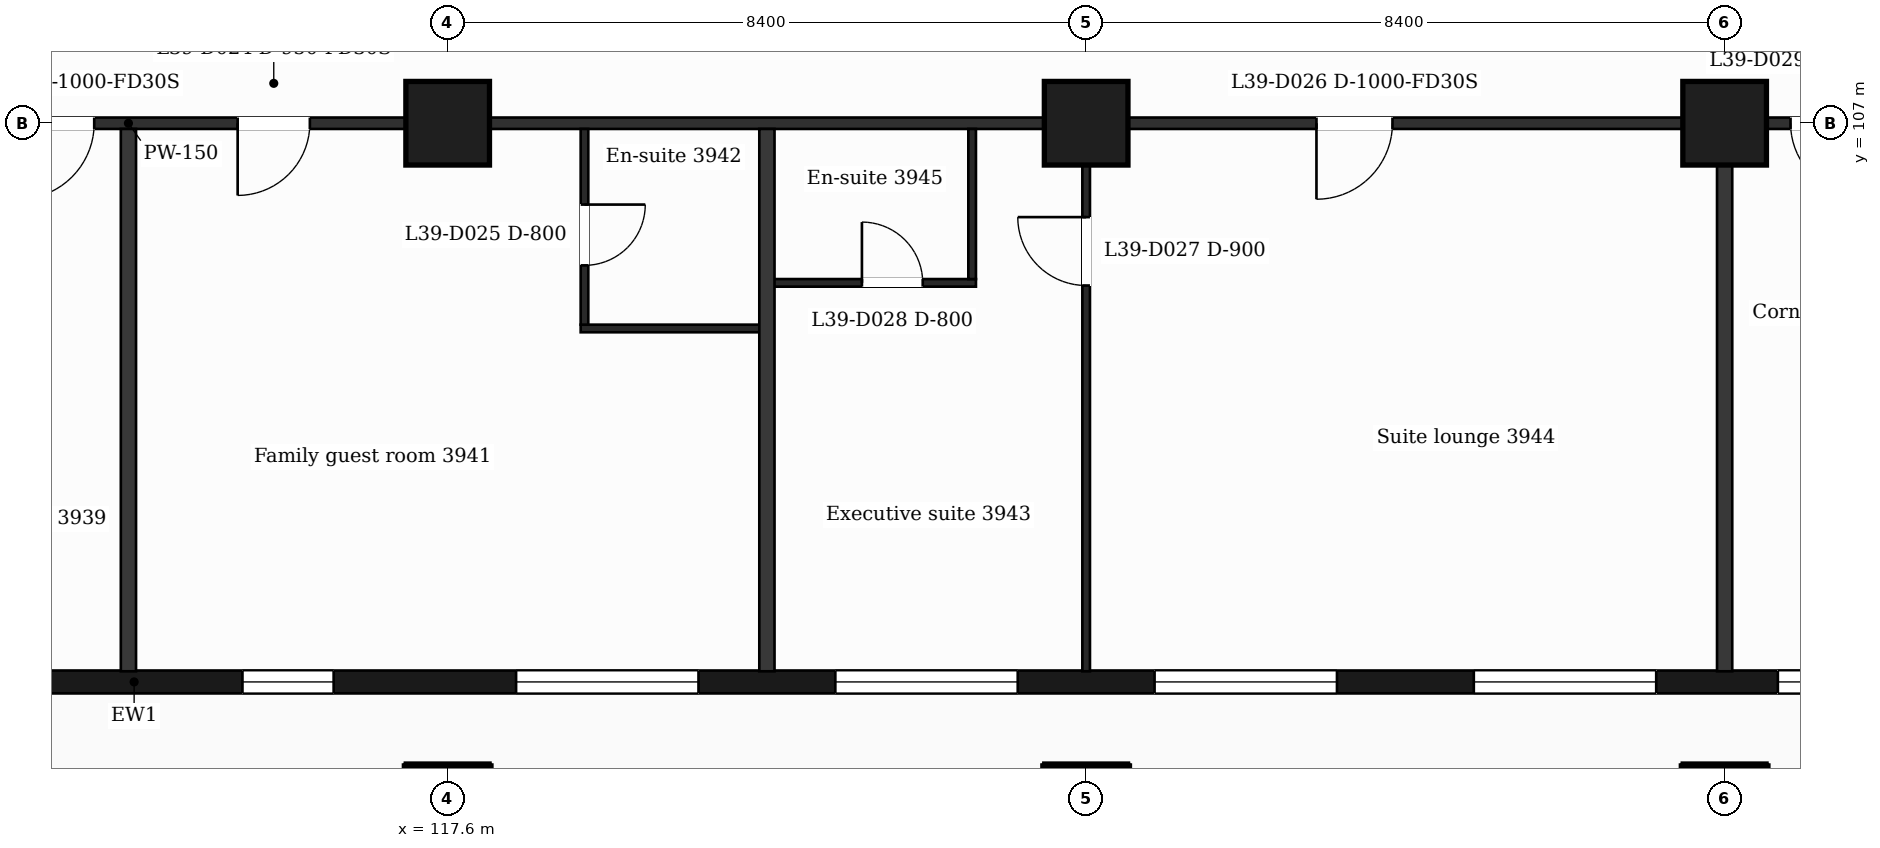
"""IFC4 building model, lengths in metres.
Left out: names, types, materials, properties, quantities, classifications, styles, units other than length and angle.
Written with IfcOpenShell. Run it as: python <this file> out.ifc"""

import sys

from ifc_helpers import new_model, si_unit, direction, frame, frame_2d, origin, origin_2d, place, context, subcontext, project, spatial, rectangle, extrude, element, fill, save


model = new_model("IFC4")
c1 = context("Model", 3, precision=1e-05, world=origin(), true_north=direction((0.0, 1.0)))
c2 = subcontext(c1, "Body", "Model", "MODEL_VIEW")
j1 = project(units=[si_unit("LENGTHUNIT", "METRE"), si_unit("PLANEANGLEUNIT", "RADIAN")], contexts=[c1])
p1 = place(None, origin())
s1 = spatial("IfcSite", under=j1, at=p1, CompositionType="ELEMENT")
p2 = place(p1, origin())
s2 = spatial("IfcBuilding", under=s1, at=p2, CompositionType="ELEMENT")
p3 = place(p2, frame((0.0, 0.0, 166.3)))
s3 = spatial("IfcBuildingStorey", under=s2, at=p3, CompositionType="ELEMENT", Elevation=166.3)
for number, where, z_axis, x_axis in (
    (1, (117.6, 98.0, 0.0), (0.0, 0.0, 1.0), (1.0, 0.0, 0.0)),
    (2, (126.0, 98.0, 0.0), (0.0, 0.0, 1.0), (1.0, 0.0, 0.0)),
    (3, (134.4, 98.0, 0.0), (0.0, 0.0, 1.0), (1.0, 0.0, 0.0)),
    (4, (117.6, 107.0, 0.0), (0.0, 0.0, 1.0), (1.0, 0.0, 0.0)),
    (5, (126.0, 107.0, 0.0), (0.0, 0.0, 1.0), (1.0, 0.0, 0.0)),
    (6, (134.4, 107.0, 0.0), (0.0, 0.0, 1.0), (1.0, 0.0, 0.0)),
):
    element("IfcColumn", number, at=place(p3, frame(where, z_axis=z_axis, x_axis=x_axis)), inside=s3, PredefinedType="COLUMN", context=c2, shape_type="SweptSolid", body=[
        extrude(rectangle(XDim=1.1, YDim=1.1, at=origin_2d()), origin(), (0.0, 0.0, 1.0), 3.7),
    ])
p4 = place(p3, frame((89.85, 99.65, 0.0), z_axis=(0.0, 0.0, 1.0), x_axis=(1.0, 0.0, 0.0)))
e7 = element("IfcWall", 7, at=p4, inside=s3, PredefinedType="SOLIDWALL", context=c2, shape_type="SweptSolid", body=[
    extrude(rectangle(XDim=47.25, YDim=0.3, at=frame_2d((23.625, 0.0))), origin(), (0.0, 0.0, 1.0), 3.38),
])
p5 = place(p4, frame((0.725, 0.0, 0.9)))
e8 = element("IfcOpeningElement", 8, at=p5, cuts=e7, PredefinedType="OPENING", context=c2, shape_type="SweptSolid", body=[
    extrude(rectangle(XDim=1.2, YDim=2.1, at=frame_2d((0.6, 1.05))), frame((0.0, 0.16, 0.0), z_axis=(0.0, -1.0, 0.0), x_axis=(1.0, 0.0, 0.0)), (0.0, 0.0, 1.0), 0.32),
])
p6 = place(p4, frame((3.45, 0.0, 0.9)))
e9 = element("IfcOpeningElement", 9, at=p6, cuts=e7, PredefinedType="OPENING", context=c2, shape_type="SweptSolid", body=[
    extrude(rectangle(XDim=2.4, YDim=2.1, at=frame_2d((1.2, 1.05))), frame((0.0, 0.16, 0.0), z_axis=(0.0, -1.0, 0.0), x_axis=(1.0, 0.0, 0.0)), (0.0, 0.0, 1.0), 0.32),
])
p7 = place(p4, frame((7.35, 0.0, 0.0)))
e10 = element("IfcOpeningElement", 10, at=p7, cuts=e7, PredefinedType="OPENING", context=c2, shape_type="SweptSolid", body=[
    extrude(rectangle(XDim=1.2, YDim=2.4, at=frame_2d((0.6, 1.2))), frame((0.0, 0.16, 0.0), z_axis=(0.0, -1.0, 0.0), x_axis=(1.0, 0.0, 0.0)), (0.0, 0.0, 1.0), 0.32),
])
p8 = place(p4, frame((9.15, 0.0, 0.9)))
e11 = element("IfcOpeningElement", 11, at=p8, cuts=e7, PredefinedType="OPENING", context=c2, shape_type="SweptSolid", body=[
    extrude(rectangle(XDim=1.2, YDim=2.1, at=frame_2d((0.6, 1.05))), frame((0.0, 0.16, 0.0), z_axis=(0.0, -1.0, 0.0), x_axis=(1.0, 0.0, 0.0)), (0.0, 0.0, 1.0), 0.32),
])
p9 = place(p4, frame((11.85, 0.0, 0.9)))
e12 = element("IfcOpeningElement", 12, at=p9, cuts=e7, PredefinedType="OPENING", context=c2, shape_type="SweptSolid", body=[
    extrude(rectangle(XDim=2.4, YDim=2.1, at=frame_2d((1.2, 1.05))), frame((0.0, 0.16, 0.0), z_axis=(0.0, -1.0, 0.0), x_axis=(1.0, 0.0, 0.0)), (0.0, 0.0, 1.0), 0.32),
])
p10 = place(p4, frame((16.05, 0.0, 0.9)))
e13 = element("IfcOpeningElement", 13, at=p10, cuts=e7, PredefinedType="OPENING", context=c2, shape_type="SweptSolid", body=[
    extrude(rectangle(XDim=2.4, YDim=2.1, at=frame_2d((1.2, 1.05))), frame((0.0, 0.16, 0.0), z_axis=(0.0, -1.0, 0.0), x_axis=(1.0, 0.0, 0.0)), (0.0, 0.0, 1.0), 0.32),
])
p11 = place(p4, frame((20.85, 0.0, 0.9)))
e14 = element("IfcOpeningElement", 14, at=p11, cuts=e7, PredefinedType="OPENING", context=c2, shape_type="SweptSolid", body=[
    extrude(rectangle(XDim=1.2, YDim=2.1, at=frame_2d((0.6, 1.05))), frame((0.0, 0.16, 0.0), z_axis=(0.0, -1.0, 0.0), x_axis=(1.0, 0.0, 0.0)), (0.0, 0.0, 1.0), 0.32),
])
p12 = place(p4, frame((25.05, 0.0, 0.9)))
e15 = element("IfcOpeningElement", 15, at=p12, cuts=e7, PredefinedType="OPENING", context=c2, shape_type="SweptSolid", body=[
    extrude(rectangle(XDim=1.2, YDim=2.1, at=frame_2d((0.6, 1.05))), frame((0.0, 0.16, 0.0), z_axis=(0.0, -1.0, 0.0), x_axis=(1.0, 0.0, 0.0)), (0.0, 0.0, 1.0), 0.32),
])
p13 = place(p4, frame((28.65, 0.0, 0.9)))
e16 = element("IfcOpeningElement", 16, at=p13, cuts=e7, PredefinedType="OPENING", context=c2, shape_type="SweptSolid", body=[
    extrude(rectangle(XDim=2.4, YDim=2.1, at=frame_2d((1.2, 1.05))), frame((0.0, 0.16, 0.0), z_axis=(0.0, -1.0, 0.0), x_axis=(1.0, 0.0, 0.0)), (0.0, 0.0, 1.0), 0.32),
])
p14 = place(p4, frame((32.85, 0.0, 0.9)))
e17 = element("IfcOpeningElement", 17, at=p14, cuts=e7, PredefinedType="OPENING", context=c2, shape_type="SweptSolid", body=[
    extrude(rectangle(XDim=2.4, YDim=2.1, at=frame_2d((1.2, 1.05))), frame((0.0, 0.16, 0.0), z_axis=(0.0, -1.0, 0.0), x_axis=(1.0, 0.0, 0.0)), (0.0, 0.0, 1.0), 0.32),
])
p15 = place(p4, frame((37.05, 0.0, 0.9)))
e18 = element("IfcOpeningElement", 18, at=p15, cuts=e7, PredefinedType="OPENING", context=c2, shape_type="SweptSolid", body=[
    extrude(rectangle(XDim=2.4, YDim=2.1, at=frame_2d((1.2, 1.05))), frame((0.0, 0.16, 0.0), z_axis=(0.0, -1.0, 0.0), x_axis=(1.0, 0.0, 0.0)), (0.0, 0.0, 1.0), 0.32),
])
p16 = place(p4, frame((41.25, 0.0, 0.9)))
e19 = element("IfcOpeningElement", 19, at=p16, cuts=e7, PredefinedType="OPENING", context=c2, shape_type="SweptSolid", body=[
    extrude(rectangle(XDim=2.4, YDim=2.1, at=frame_2d((1.2, 1.05))), frame((0.0, 0.16, 0.0), z_axis=(0.0, -1.0, 0.0), x_axis=(1.0, 0.0, 0.0)), (0.0, 0.0, 1.0), 0.32),
])
p17 = place(p4, frame((45.25, 0.0, 0.9)))
e20 = element("IfcOpeningElement", 20, at=p17, cuts=e7, PredefinedType="OPENING", context=c2, shape_type="SweptSolid", body=[
    extrude(rectangle(XDim=1.2, YDim=2.1, at=frame_2d((0.6, 1.05))), frame((0.0, 0.16, 0.0), z_axis=(0.0, -1.0, 0.0), x_axis=(1.0, 0.0, 0.0)), (0.0, 0.0, 1.0), 0.32),
])
p18 = place(p3, frame((119.35, 104.3, 0.0), z_axis=(0.0, 0.0, 1.0), x_axis=(1.0, 0.0, 0.0)))
e21 = element("IfcWall", 21, at=p18, inside=s3, PredefinedType="PARTITIONING", context=c2, shape_type="SweptSolid", body=[
    extrude(rectangle(XDim=2.45, YDim=0.1, at=frame_2d((1.225, 0.0))), origin(), (0.0, 0.0, 1.0), 3.38),
])
p19 = place(p3, frame((121.8, 104.9, 0.0), z_axis=(0.0, 0.0, 1.0), x_axis=(1.0, 0.0, 0.0)))
e22 = element("IfcWall", 22, at=p19, inside=s3, PredefinedType="PARTITIONING", context=c2, shape_type="SweptSolid", body=[
    extrude(rectangle(XDim=2.75, YDim=0.1, at=frame_2d((1.375, 0.0))), origin(), (0.0, 0.0, 1.0), 3.38),
])
p20 = place(p19, frame((1.25, 0.0, 0.0)))
e23 = element("IfcOpeningElement", 23, at=p20, cuts=e22, PredefinedType="OPENING", context=c2, shape_type="SweptSolid", body=[
    extrude(rectangle(XDim=0.8, YDim=2.1, at=frame_2d((0.4, 1.05))), frame((0.0, 0.06, 0.0), z_axis=(0.0, -1.0, 0.0), x_axis=(1.0, 0.0, 0.0)), (0.0, 0.0, 1.0), 0.12),
])
p21 = place(p3, frame((87.018, 107.0, 0.0), z_axis=(0.0, 0.0, 1.0), x_axis=(1.0, 0.0, 0.0)))
e24 = element("IfcWall", 24, at=p21, inside=s3, PredefinedType="PARTITIONING", context=c2, shape_type="SweptSolid", body=[
    extrude(rectangle(XDim=52.765, YDim=0.15, at=frame_2d((26.382, 0.0))), origin(), (0.0, 0.0, 1.0), 3.38),
])
p22 = place(p21, frame((0.463, 0.0, 0.0)))
e25 = element("IfcOpeningElement", 25, at=p22, cuts=e24, PredefinedType="OPENING", context=c2, shape_type="SweptSolid", body=[
    extrude(rectangle(XDim=0.95, YDim=2.1, at=frame_2d((0.475, 1.05))), frame((0.0, 0.085, 0.0), z_axis=(0.0, -1.0, 0.0), x_axis=(1.0, 0.0, 0.0)), (0.0, 0.0, 1.0), 0.17),
])
p23 = place(p21, frame((6.369, 0.0, 0.0)))
e26 = element("IfcOpeningElement", 26, at=p23, cuts=e24, PredefinedType="OPENING", context=c2, shape_type="SweptSolid", body=[
    extrude(rectangle(XDim=0.95, YDim=2.1, at=frame_2d((0.475, 1.05))), frame((0.0, 0.085, 0.0), z_axis=(0.0, -1.0, 0.0), x_axis=(1.0, 0.0, 0.0)), (0.0, 0.0, 1.0), 0.17),
])
p24 = place(p21, frame((9.857, 0.0, 0.0)))
e27 = element("IfcOpeningElement", 27, at=p24, cuts=e24, PredefinedType="OPENING", context=c2, shape_type="SweptSolid", body=[
    extrude(rectangle(XDim=0.95, YDim=2.1, at=frame_2d((0.475, 1.05))), frame((0.0, 0.085, 0.0), z_axis=(0.0, -1.0, 0.0), x_axis=(1.0, 0.0, 0.0)), (0.0, 0.0, 1.0), 0.17),
])
p25 = place(p21, frame((15.382, 0.0, 0.0)))
e28 = element("IfcOpeningElement", 28, at=p25, cuts=e24, PredefinedType="OPENING", context=c2, shape_type="SweptSolid", body=[
    extrude(rectangle(XDim=1.0, YDim=2.1, at=frame_2d((0.5, 1.05))), frame((0.0, 0.085, 0.0), z_axis=(0.0, -1.0, 0.0), x_axis=(1.0, 0.0, 0.0)), (0.0, 0.0, 1.0), 0.17),
])
p26 = place(p21, frame((24.932, 0.0, 0.0)))
e29 = element("IfcOpeningElement", 29, at=p26, cuts=e24, PredefinedType="OPENING", context=c2, shape_type="SweptSolid", body=[
    extrude(rectangle(XDim=1.0, YDim=2.1, at=frame_2d((0.5, 1.05))), frame((0.0, 0.085, 0.0), z_axis=(0.0, -1.0, 0.0), x_axis=(1.0, 0.0, 0.0)), (0.0, 0.0, 1.0), 0.17),
])
p27 = place(p21, frame((27.819, 0.0, 0.0)))
e30 = element("IfcOpeningElement", 30, at=p27, cuts=e24, PredefinedType="OPENING", context=c2, shape_type="SweptSolid", body=[
    extrude(rectangle(XDim=0.95, YDim=2.1, at=frame_2d((0.475, 1.05))), frame((0.0, 0.085, 0.0), z_axis=(0.0, -1.0, 0.0), x_axis=(1.0, 0.0, 0.0)), (0.0, 0.0, 1.0), 0.17),
])
p28 = place(p21, frame((42.012, 0.0, 0.0)))
e31 = element("IfcOpeningElement", 31, at=p28, cuts=e24, PredefinedType="OPENING", context=c2, shape_type="SweptSolid", body=[
    extrude(rectangle(XDim=1.0, YDim=2.1, at=frame_2d((0.5, 1.05))), frame((0.0, 0.085, 0.0), z_axis=(0.0, -1.0, 0.0), x_axis=(1.0, 0.0, 0.0)), (0.0, 0.0, 1.0), 0.17),
])
p29 = place(p21, frame((48.249, 0.0, 0.0)))
e32 = element("IfcOpeningElement", 32, at=p29, cuts=e24, PredefinedType="OPENING", context=c2, shape_type="SweptSolid", body=[
    extrude(rectangle(XDim=0.95, YDim=2.1, at=frame_2d((0.475, 1.05))), frame((0.0, 0.085, 0.0), z_axis=(0.0, -1.0, 0.0), x_axis=(1.0, 0.0, 0.0)), (0.0, 0.0, 1.0), 0.17),
])
p30 = place(p3, frame((113.4, 99.79, 0.0), z_axis=(0.0, 0.0, 1.0), x_axis=(0.0, 1.0, 0.0)))
e33 = element("IfcWall", 33, at=p30, inside=s3, PredefinedType="PARTITIONING", context=c2, shape_type="SweptSolid", body=[
    extrude(rectangle(XDim=7.135, YDim=0.2, at=frame_2d((3.567, 0.0))), origin(), (0.0, 0.0, 1.0), 3.38),
])
p31 = place(p3, frame((119.4, 104.35, 0.0), z_axis=(0.0, 0.0, 1.0), x_axis=(0.0, 1.0, 0.0)))
e34 = element("IfcWall", 34, at=p31, inside=s3, PredefinedType="PARTITIONING", context=c2, shape_type="SweptSolid", body=[
    extrude(rectangle(XDim=2.575, YDim=0.1, at=frame_2d((1.288, 0.0))), origin(), (0.0, 0.0, 1.0), 3.38),
])
p32 = place(p31, frame((0.78, 0.0, 0.0)))
e35 = element("IfcOpeningElement", 35, at=p32, cuts=e34, PredefinedType="OPENING", context=c2, shape_type="SweptSolid", body=[
    extrude(rectangle(XDim=0.8, YDim=2.1, at=frame_2d((0.4, 1.05))), frame((0.0, 0.06, 0.0), z_axis=(0.0, -1.0, 0.0), x_axis=(1.0, 0.0, 0.0)), (0.0, 0.0, 1.0), 0.12),
])
p33 = place(p3, frame((121.8, 99.79, 0.0), z_axis=(0.0, 0.0, 1.0), x_axis=(0.0, 1.0, 0.0)))
e36 = element("IfcWall", 36, at=p33, inside=s3, PredefinedType="PARTITIONING", context=c2, shape_type="SweptSolid", body=[
    extrude(rectangle(XDim=7.135, YDim=0.2, at=frame_2d((3.567, 0.0))), origin(), (0.0, 0.0, 1.0), 3.38),
])
p34 = place(p3, frame((124.5, 104.95, 0.0), z_axis=(0.0, 0.0, 1.0), x_axis=(0.0, 1.0, 0.0)))
e37 = element("IfcWall", 37, at=p34, inside=s3, PredefinedType="PARTITIONING", context=c2, shape_type="SweptSolid", body=[
    extrude(rectangle(XDim=1.975, YDim=0.1, at=frame_2d((0.988, 0.0))), origin(), (0.0, 0.0, 1.0), 3.38),
])
p35 = place(p3, frame((126.0, 99.79, 0.0), z_axis=(0.0, 0.0, 1.0), x_axis=(0.0, 1.0, 0.0)))
e38 = element("IfcWall", 38, at=p35, inside=s3, PredefinedType="PARTITIONING", context=c2, shape_type="SweptSolid", body=[
    extrude(rectangle(XDim=7.135, YDim=0.1, at=frame_2d((3.567, 0.0))), origin(), (0.0, 0.0, 1.0), 3.38),
])
p36 = place(p35, frame((5.075, 0.0, 0.0)))
e39 = element("IfcOpeningElement", 39, at=p36, cuts=e38, PredefinedType="OPENING", context=c2, shape_type="SweptSolid", body=[
    extrude(rectangle(XDim=0.9, YDim=2.1, at=frame_2d((0.45, 1.05))), frame((0.0, 0.06, 0.0), z_axis=(0.0, -1.0, 0.0), x_axis=(1.0, 0.0, 0.0)), (0.0, 0.0, 1.0), 0.12),
])
p37 = place(p3, frame((134.4, 99.79, 0.0), z_axis=(0.0, 0.0, 1.0), x_axis=(0.0, 1.0, 0.0)))
e40 = element("IfcWall", 40, at=p37, inside=s3, PredefinedType="PARTITIONING", context=c2, shape_type="SweptSolid", body=[
    extrude(rectangle(XDim=7.135, YDim=0.2, at=frame_2d((3.567, 0.0))), origin(), (0.0, 0.0, 1.0), 3.38),
])
p38 = place(p12, origin())
e41 = element("IfcWindow", 41, at=p38, inside=s3, PartitioningType="SINGLE_PANEL", PredefinedType="WINDOW", context=c2, shape_type="SweptSolid", body=[
    extrude(rectangle(XDim=1.2, YDim=2.1, at=frame_2d((0.6, 1.05))), frame((0.0, 0.03, 0.0), z_axis=(0.0, -1.0, 0.0), x_axis=(1.0, 0.0, 0.0)), (0.0, 0.0, 1.0), 0.06),
])
fill(e15, e41)
p39 = place(p13, origin())
e42 = element("IfcWindow", 42, at=p39, inside=s3, PartitioningType="SINGLE_PANEL", PredefinedType="WINDOW", context=c2, shape_type="SweptSolid", body=[
    extrude(rectangle(XDim=2.4, YDim=2.1, at=frame_2d((1.2, 1.05))), frame((0.0, 0.03, 0.0), z_axis=(0.0, -1.0, 0.0), x_axis=(1.0, 0.0, 0.0)), (0.0, 0.0, 1.0), 0.06),
])
fill(e16, e42)
p40 = place(p14, origin())
e43 = element("IfcWindow", 43, at=p40, inside=s3, PartitioningType="SINGLE_PANEL", PredefinedType="WINDOW", context=c2, shape_type="SweptSolid", body=[
    extrude(rectangle(XDim=2.4, YDim=2.1, at=frame_2d((1.2, 1.05))), frame((0.0, 0.03, 0.0), z_axis=(0.0, -1.0, 0.0), x_axis=(1.0, 0.0, 0.0)), (0.0, 0.0, 1.0), 0.06),
])
fill(e17, e43)
p41 = place(p15, origin())
e44 = element("IfcWindow", 44, at=p41, inside=s3, PartitioningType="SINGLE_PANEL", PredefinedType="WINDOW", context=c2, shape_type="SweptSolid", body=[
    extrude(rectangle(XDim=2.4, YDim=2.1, at=frame_2d((1.2, 1.05))), frame((0.0, 0.03, 0.0), z_axis=(0.0, -1.0, 0.0), x_axis=(1.0, 0.0, 0.0)), (0.0, 0.0, 1.0), 0.06),
])
fill(e18, e44)
p42 = place(p16, origin())
e45 = element("IfcWindow", 45, at=p42, inside=s3, PartitioningType="SINGLE_PANEL", PredefinedType="WINDOW", context=c2, shape_type="SweptSolid", body=[
    extrude(rectangle(XDim=2.4, YDim=2.1, at=frame_2d((1.2, 1.05))), frame((0.0, 0.03, 0.0), z_axis=(0.0, -1.0, 0.0), x_axis=(1.0, 0.0, 0.0)), (0.0, 0.0, 1.0), 0.06),
])
fill(e19, e45)
p43 = place(p17, origin())
e46 = element("IfcWindow", 46, at=p43, inside=s3, PartitioningType="SINGLE_PANEL", PredefinedType="WINDOW", context=c2, shape_type="SweptSolid", body=[
    extrude(rectangle(XDim=1.2, YDim=2.1, at=frame_2d((0.6, 1.05))), frame((0.0, 0.03, 0.0), z_axis=(0.0, -1.0, 0.0), x_axis=(1.0, 0.0, 0.0)), (0.0, 0.0, 1.0), 0.06),
])
fill(e20, e46)
p44 = place(p26, origin())
e47 = element("IfcDoor", 47, at=p44, inside=s3, OperationType="SINGLE_SWING_LEFT", PredefinedType="DOOR", context=c2, shape_type="SweptSolid", body=[
    extrude(rectangle(XDim=1.0, YDim=2.1, at=frame_2d((0.5, 1.05))), frame((0.0, 0.025, 0.0), z_axis=(0.0, -1.0, 0.0), x_axis=(1.0, 0.0, 0.0)), (0.0, 0.0, 1.0), 0.05),
])
fill(e29, e47)
p45 = place(p27, origin())
e48 = element("IfcDoor", 48, at=p45, inside=s3, OperationType="SINGLE_SWING_LEFT", PredefinedType="DOOR", context=c2, shape_type="SweptSolid", body=[
    extrude(rectangle(XDim=0.95, YDim=2.1, at=frame_2d((0.475, 1.05))), frame((0.0, 0.025, 0.0), z_axis=(0.0, -1.0, 0.0), x_axis=(1.0, 0.0, 0.0)), (0.0, 0.0, 1.0), 0.05),
])
fill(e30, e48)
p46 = place(p32, origin())
e49 = element("IfcDoor", 49, at=p46, inside=s3, OperationType="SINGLE_SWING_RIGHT", PredefinedType="DOOR", context=c2, shape_type="SweptSolid", body=[
    extrude(rectangle(XDim=0.8, YDim=2.1, at=frame_2d((0.4, 1.05))), frame((0.0, 0.025, 0.0), z_axis=(0.0, -1.0, 0.0), x_axis=(1.0, 0.0, 0.0)), (0.0, 0.0, 1.0), 0.05),
])
fill(e35, e49)
p47 = place(p28, origin())
e50 = element("IfcDoor", 50, at=p47, inside=s3, OperationType="SINGLE_SWING_LEFT", PredefinedType="DOOR", context=c2, shape_type="SweptSolid", body=[
    extrude(rectangle(XDim=1.0, YDim=2.1, at=frame_2d((0.5, 1.05))), frame((0.0, 0.025, 0.0), z_axis=(0.0, -1.0, 0.0), x_axis=(1.0, 0.0, 0.0)), (0.0, 0.0, 1.0), 0.05),
])
fill(e31, e50)
p48 = place(p36, origin())
e51 = element("IfcDoor", 51, at=p48, inside=s3, OperationType="SINGLE_SWING_RIGHT", PredefinedType="DOOR", context=c2, shape_type="SweptSolid", body=[
    extrude(rectangle(XDim=0.9, YDim=2.1, at=frame_2d((0.45, 1.05))), frame((0.0, 0.025, 0.0), z_axis=(0.0, -1.0, 0.0), x_axis=(1.0, 0.0, 0.0)), (0.0, 0.0, 1.0), 0.05),
])
fill(e39, e51)
p49 = place(p20, origin())
e52 = element("IfcDoor", 52, at=p49, inside=s3, OperationType="SINGLE_SWING_LEFT", PredefinedType="DOOR", context=c2, shape_type="SweptSolid", body=[
    extrude(rectangle(XDim=0.8, YDim=2.1, at=frame_2d((0.4, 1.05))), frame((0.0, 0.025, 0.0), z_axis=(0.0, -1.0, 0.0), x_axis=(1.0, 0.0, 0.0)), (0.0, 0.0, 1.0), 0.05),
])
fill(e23, e52)
p50 = place(p29, origin())
e53 = element("IfcDoor", 53, at=p50, inside=s3, OperationType="SINGLE_SWING_RIGHT", PredefinedType="DOOR", context=c2, shape_type="SweptSolid", body=[
    extrude(rectangle(XDim=0.95, YDim=2.1, at=frame_2d((0.475, 1.05))), frame((0.0, 0.025, 0.0), z_axis=(0.0, -1.0, 0.0), x_axis=(1.0, 0.0, 0.0)), (0.0, 0.0, 1.0), 0.05),
])
fill(e32, e53)
save(model, sys.argv[1])
